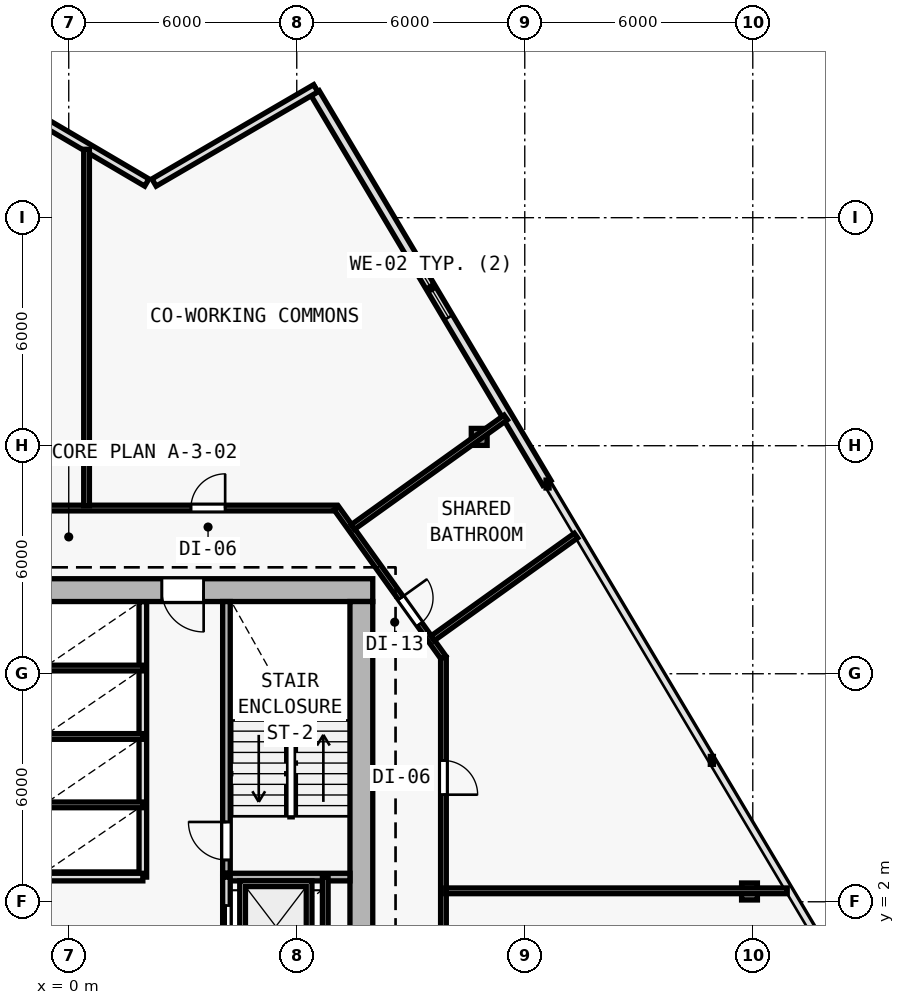
"""IFC4 building model, lengths in metres.
Left out: names, types, materials, properties, quantities, classifications, styles, units other than length and angle.
Written with IfcOpenShell. Run it as: python <this file> out.ifc"""

import sys

from ifc_helpers import new_model, si_unit, direction, frame, frame_2d, origin, origin_2d, place, context, subcontext, project, spatial, rectangle, i_section, extrude, element, fill, save


model = new_model("IFC4")
c1 = context("Model", 3, precision=1e-05, world=origin(), true_north=direction((0.0, 1.0)))
c2 = subcontext(c1, "Body", "Model", "MODEL_VIEW")
j1 = project(units=[si_unit("LENGTHUNIT", "METRE"), si_unit("PLANEANGLEUNIT", "RADIAN")], contexts=[c1])
p1 = place(None, origin())
s1 = spatial("IfcSite", under=j1, at=p1, CompositionType="ELEMENT")
p2 = place(p1, origin())
s2 = spatial("IfcBuilding", under=s1, at=p2, CompositionType="ELEMENT")
p3 = place(p2, frame((0.0, 0.0, 33.6)))
s3 = spatial("IfcBuildingStorey", under=s2, at=p3, CompositionType="ELEMENT", Elevation=33.6)
p4 = place(p3, frame((7.7, 10.2, 0.0), z_axis=(0.0, 0.0, 1.0), x_axis=(1.0, 0.0, 0.0)))
e1 = element("IfcColumn", 1, at=p4, inside=s3, PredefinedType="COLUMN", context=c2, shape_type="SweptSolid", body=[
    extrude(i_section(OverallWidth=0.416, OverallDepth=0.446, WebThickness=0.025, FlangeThickness=0.04, FilletRadius=0.015, at=origin_2d()), origin(), (0.0, 0.0, 1.0), 3.6),
])
p5 = place(p3, frame((17.914, 2.271, 0.005), z_axis=(-0.018906041, 0.009521027842, 0.999775930718), x_axis=(-0.449781931574, -0.893138406984, 0.0)))
e2 = element("IfcColumn", 2, at=p5, inside=s3, PredefinedType="COLUMN", context=c2, shape_type="SweptSolid", body=[
    extrude(i_section(OverallWidth=0.416, OverallDepth=0.446, WebThickness=0.025, FlangeThickness=0.04, FilletRadius=0.015, at=origin_2d()), origin(), (0.0, 0.0, 1.0), 3.59),
])
p6 = place(p3, frame((10.801, 14.232, 0.005), z_axis=(-0.011767054935, -0.002516653368, 0.999927598816), x_axis=(0.209143047003, -0.977885057607, 0.0)))
e3 = element("IfcColumn", 3, at=p6, inside=s3, PredefinedType="COLUMN", context=c2, shape_type="SweptSolid", body=[
    extrude(i_section(OverallWidth=0.416, OverallDepth=0.446, WebThickness=0.025, FlangeThickness=0.04, FilletRadius=0.015, at=origin_2d()), origin(), (0.0, 0.0, 1.0), 3.589),
])
p7 = place(p3, frame((6.483, 23.278, 0.0), z_axis=(0.0, 0.0, 1.0), x_axis=(0.511086421046, -0.859529330635, 0.0)))
e4 = element("IfcWall", 4, at=p7, inside=s3, PredefinedType="SOLIDWALL", context=c2, shape_type="SweptSolid", body=[
    extrude(rectangle(XDim=11.935, YDim=0.25, at=frame_2d((5.968, 0.0))), origin(), (0.0, 0.0, 1.0), 3.35),
])
p8 = place(p7, frame((5.068, 0.0, 0.62)))
e5 = element("IfcOpeningElement", 5, at=p8, cuts=e4, PredefinedType="OPENING", context=c2, shape_type="SweptSolid", body=[
    extrude(rectangle(XDim=1.8, YDim=2.1, at=frame_2d((0.9, 1.05))), frame((0.0, 0.135, 0.0), z_axis=(0.0, -1.0, 0.0), x_axis=(1.0, 0.0, 0.0)), (0.0, 0.0, 1.0), 0.27),
])
p9 = place(p3, frame((2.245, 20.925, 0.0), z_axis=(0.0, 0.0, 1.0), x_axis=(0.863967641515, 0.503547330858, 0.0)))
e6 = element("IfcWall", 6, at=p9, inside=s3, PredefinedType="SOLIDWALL", context=c2, shape_type="SweptSolid", body=[
    extrude(rectangle(XDim=4.925, YDim=0.22, at=frame_2d((2.462, 0.0))), origin(), (0.0, 0.0, 1.0), 3.35),
])
p10 = place(p3, frame((-2.635, 23.681, 0.0), z_axis=(0.0, 0.0, 1.0), x_axis=(0.862126841454, -0.506692519428, 0.0)))
e7 = element("IfcWall", 7, at=p10, inside=s3, PredefinedType="SOLIDWALL", context=c2, shape_type="SweptSolid", body=[
    extrude(rectangle(XDim=5.439, YDim=0.22, at=frame_2d((2.72, 0.0))), origin(), (0.0, 0.0, 1.0), 3.35),
])
p11 = place(p3, frame((8.0, 10.2, 0.0), z_axis=(0.0, 0.0, 1.0), x_axis=(-1.0, 0.0, 0.0)))
e8 = element("IfcWall", 8, at=p11, inside=s3, PredefinedType="SHEAR", context=c2, shape_type="SweptSolid", body=[
    extrude(rectangle(XDim=16.0, YDim=0.6, at=frame_2d((8.0, 0.0))), origin(), (0.0, 0.0, 1.0), 3.35),
])
p12 = place(p11, frame((4.45, 0.0, 0.0)))
e9 = element("IfcOpeningElement", 9, at=p12, cuts=e8, PredefinedType="OPENING", context=c2, shape_type="SweptSolid", body=[
    extrude(rectangle(XDim=1.1, YDim=2.15, at=frame_2d((0.55, 1.075))), frame((0.0, 0.31, 0.0), z_axis=(0.0, -1.0, 0.0), x_axis=(1.0, 0.0, 0.0)), (0.0, 0.0, 1.0), 0.62),
])
p13 = place(p3, frame((7.7, 9.9, 0.0), z_axis=(0.0, 0.0, 1.0), x_axis=(0.0, -1.0, 0.0)))
e10 = element("IfcWall", 10, at=p13, inside=s3, PredefinedType="SHEAR", context=c2, shape_type="SweptSolid", body=[
    extrude(rectangle(XDim=19.0, YDim=0.6, at=frame_2d((9.5, 0.0))), origin(), (0.0, 0.0, 1.0), 3.35),
])
p14 = place(p3, frame((4.15, 2.75, 0.0), z_axis=(0.0, 0.0, 1.0), x_axis=(0.0, 1.0, 0.0)))
e11 = element("IfcWall", 11, at=p14, inside=s3, PredefinedType="SOLIDWALL", context=c2, shape_type="SweptSolid", body=[
    extrude(rectangle(XDim=7.15, YDim=0.2, at=frame_2d((3.575, 0.0))), origin(), (0.0, 0.0, 1.0), 3.35),
])
p15 = place(p14, frame((0.35, 0.0, 0.0)))
e12 = element("IfcOpeningElement", 12, at=p15, cuts=e11, PredefinedType="OPENING", context=c2, shape_type="SweptSolid", body=[
    extrude(rectangle(XDim=1.0, YDim=2.15, at=frame_2d((0.5, 1.075))), frame((0.0, 0.11, 0.0), z_axis=(0.0, -1.0, 0.0), x_axis=(1.0, 0.0, 0.0)), (0.0, 0.0, 1.0), 0.22),
])
p16 = place(p3, frame((4.05, 2.65, 0.0), z_axis=(0.0, 0.0, 1.0), x_axis=(1.0, 0.0, 0.0)))
e13 = element("IfcWall", 13, at=p16, inside=s3, PredefinedType="SOLIDWALL", context=c2, shape_type="SweptSolid", body=[
    extrude(rectangle(XDim=3.35, YDim=0.2, at=frame_2d((1.675, 0.0))), origin(), (0.0, 0.0, 1.0), 3.35),
])
p17 = place(p3, frame((4.15, -6.05, 0.0), z_axis=(0.0, 0.0, 1.0), x_axis=(0.0, 1.0, 0.0)))
e14 = element("IfcWall", 14, at=p17, inside=s3, PredefinedType="SOLIDWALL", context=c2, shape_type="SweptSolid", body=[
    extrude(rectangle(XDim=8.7, YDim=0.2, at=frame_2d((4.35, 0.0))), origin(), (0.0, 0.0, 1.0), 3.35),
])
p18 = place(p17, frame((0.55, 0.0, 0.0)))
e15 = element("IfcOpeningElement", 15, at=p18, cuts=e14, PredefinedType="OPENING", context=c2, shape_type="SweptSolid", body=[
    extrude(rectangle(XDim=1.1, YDim=2.15, at=frame_2d((0.55, 1.075))), frame((0.0, 0.11, 0.0), z_axis=(0.0, -1.0, 0.0), x_axis=(1.0, 0.0, 0.0)), (0.0, 0.0, 1.0), 0.22),
])
p19 = place(p17, frame((2.65, 0.0, 0.0)))
e16 = element("IfcOpeningElement", 16, at=p19, cuts=e14, PredefinedType="OPENING", context=c2, shape_type="SweptSolid", body=[
    extrude(rectangle(XDim=1.1, YDim=2.15, at=frame_2d((0.55, 1.075))), frame((0.0, 0.11, 0.0), z_axis=(0.0, -1.0, 0.0), x_axis=(1.0, 0.0, 0.0)), (0.0, 0.0, 1.0), 0.22),
])
p20 = place(p17, frame((4.75, 0.0, 0.0)))
e17 = element("IfcOpeningElement", 17, at=p20, cuts=e14, PredefinedType="OPENING", context=c2, shape_type="SweptSolid", body=[
    extrude(rectangle(XDim=1.1, YDim=2.15, at=frame_2d((0.55, 1.075))), frame((0.0, 0.11, 0.0), z_axis=(0.0, -1.0, 0.0), x_axis=(1.0, 0.0, 0.0)), (0.0, 0.0, 1.0), 0.22),
])
p21 = place(p17, frame((6.85, 0.0, 0.0)))
e18 = element("IfcOpeningElement", 18, at=p21, cuts=e14, PredefinedType="OPENING", context=c2, shape_type="SweptSolid", body=[
    extrude(rectangle(XDim=1.1, YDim=2.15, at=frame_2d((0.55, 1.075))), frame((0.0, 0.11, 0.0), z_axis=(0.0, -1.0, 0.0), x_axis=(1.0, 0.0, 0.0)), (0.0, 0.0, 1.0), 0.22),
])
p22 = place(p3, frame((6.75, -6.05, 0.0), z_axis=(0.0, 0.0, 1.0), x_axis=(0.0, 1.0, 0.0)))
e19 = element("IfcWall", 19, at=p22, inside=s3, PredefinedType="PARTITIONING", context=c2, shape_type="SweptSolid", body=[
    extrude(rectangle(XDim=8.7, YDim=0.15, at=frame_2d((4.35, 0.0))), origin(), (0.0, 0.0, 1.0), 3.35),
])
p23 = place(p3, frame((1.95, 2.65, 0.0), z_axis=(0.0, 0.0, 1.0), x_axis=(0.0, 1.0, 0.0)))
e20 = element("IfcWall", 20, at=p23, inside=s3, PredefinedType="SOLIDWALL", context=c2, shape_type="SweptSolid", body=[
    extrude(rectangle(XDim=7.245, YDim=0.2, at=frame_2d((3.623, 0.0))), origin(), (0.0, 0.0, 1.0), 3.35),
])
p24 = place(p3, frame((-0.95, 2.65, 0.0), z_axis=(0.0, 0.0, 1.0), x_axis=(1.0, 0.0, 0.0)))
e21 = element("IfcWall", 21, at=p24, inside=s3, PredefinedType="SOLIDWALL", context=c2, shape_type="SweptSolid", body=[
    extrude(rectangle(XDim=2.9, YDim=0.2, at=frame_2d((1.45, 0.0))), origin(), (0.0, 0.0, 1.0), 3.35),
])
for number, where, z_axis, x_axis in (
    (22, (-0.75, 4.55, 0.0), (0.0, 0.0, 1.0), (1.0, 0.0, 0.0)),
    (23, (-0.75, 6.35, 0.0), (0.0, 0.0, 1.0), (1.0, 0.0, 0.0)),
    (24, (-0.75, 8.15, 0.0), (0.0, 0.0, 1.0), (1.0, 0.0, 0.0)),
):
    element("IfcWall", number, at=place(p3, frame(where, z_axis=z_axis, x_axis=x_axis)), inside=s3, PredefinedType="PARTITIONING", context=c2, shape_type="SweptSolid", body=[
        extrude(rectangle(XDim=2.7, YDim=0.15, at=frame_2d((1.35, 0.0))), origin(), (0.0, 0.0, 1.0), 3.35),
    ])
p25 = place(p3, frame((-7.041, 12.36, 0.0), z_axis=(0.0, 0.0, 1.0), x_axis=(1.0, 0.0, 0.0)))
e25 = element("IfcWall", 25, at=p25, inside=s3, PredefinedType="PARTITIONING", context=c2, shape_type="SweptSolid", body=[
    extrude(rectangle(XDim=14.082, YDim=0.15, at=frame_2d((7.041, 0.0))), origin(), (0.0, 0.0, 1.0), 3.35),
])
p26 = place(p25, frame((10.257, 0.0, 0.0)))
e26 = element("IfcOpeningElement", 26, at=p26, cuts=e25, PredefinedType="OPENING", context=c2, shape_type="SweptSolid", body=[
    extrude(rectangle(XDim=0.9, YDim=2.1, at=frame_2d((0.45, 1.05))), frame((0.0, 0.085, 0.0), z_axis=(0.0, -1.0, 0.0), x_axis=(1.0, 0.0, 0.0)), (0.0, 0.0, 1.0), 0.17),
])
p27 = place(p25, frame((3.394, 0.0, 0.0)))
e27 = element("IfcOpeningElement", 27, at=p27, cuts=e25, PredefinedType="OPENING", context=c2, shape_type="SweptSolid", body=[
    extrude(rectangle(XDim=0.9, YDim=2.1, at=frame_2d((0.45, 1.05))), frame((0.0, 0.085, 0.0), z_axis=(0.0, -1.0, 0.0), x_axis=(1.0, 0.0, 0.0)), (0.0, 0.0, 1.0), 0.17),
])
p28 = place(p3, frame((7.041, 12.36, 0.0), z_axis=(0.0, 0.0, 1.0), x_axis=(0.582449511476, -0.812866881218, 0.0)))
e28 = element("IfcWall", 28, at=p28, inside=s3, PredefinedType="PARTITIONING", context=c2, shape_type="SweptSolid", body=[
    extrude(rectangle(XDim=4.84, YDim=0.15, at=frame_2d((2.42, 0.0))), origin(), (0.0, 0.0, 1.0), 2.725),
])
p29 = place(p28, frame((2.911, 0.0, 0.0)))
e29 = element("IfcOpeningElement", 29, at=p29, cuts=e28, PredefinedType="OPENING", context=c2, shape_type="SweptSolid", body=[
    extrude(rectangle(XDim=0.85, YDim=2.1, at=frame_2d((0.425, 1.05))), frame((0.0, 0.085, 0.0), z_axis=(0.0, -1.0, 0.0), x_axis=(1.0, 0.0, 0.0)), (0.0, 0.0, 1.0), 0.17),
])
p30 = place(p3, frame((9.86, 8.426, 0.0), z_axis=(0.0, 0.0, 1.0), x_axis=(0.0, -1.0, 0.0)))
e30 = element("IfcWall", 30, at=p30, inside=s3, PredefinedType="PARTITIONING", context=c2, shape_type="SweptSolid", body=[
    extrude(rectangle(XDim=19.986, YDim=0.15, at=frame_2d((9.993, 0.0))), origin(), (0.0, 0.0, 1.0), 2.609),
])
p31 = place(p30, frame((18.592, 0.0, 0.0)))
e31 = element("IfcOpeningElement", 31, at=p31, cuts=e30, PredefinedType="OPENING", context=c2, shape_type="SweptSolid", body=[
    extrude(rectangle(XDim=0.9, YDim=2.1, at=frame_2d((0.45, 1.05))), frame((0.0, 0.085, 0.0), z_axis=(0.0, -1.0, 0.0), x_axis=(1.0, 0.0, 0.0)), (0.0, 0.0, 1.0), 0.17),
])
p32 = place(p30, frame((14.386, 0.0, 0.0)))
e32 = element("IfcOpeningElement", 32, at=p32, cuts=e30, PredefinedType="OPENING", context=c2, shape_type="SweptSolid", body=[
    extrude(rectangle(XDim=0.9, YDim=2.1, at=frame_2d((0.45, 1.05))), frame((0.0, 0.085, 0.0), z_axis=(0.0, -1.0, 0.0), x_axis=(1.0, 0.0, 0.0)), (0.0, 0.0, 1.0), 0.17),
])
p33 = place(p30, frame((8.417, 0.0, 0.0)))
e33 = element("IfcOpeningElement", 33, at=p33, cuts=e30, PredefinedType="OPENING", context=c2, shape_type="SweptSolid", body=[
    extrude(rectangle(XDim=0.9, YDim=2.1, at=frame_2d((0.45, 1.05))), frame((0.0, 0.085, 0.0), z_axis=(0.0, -1.0, 0.0), x_axis=(1.0, 0.0, 0.0)), (0.0, 0.0, 1.0), 0.17),
])
p34 = place(p30, frame((2.708, 0.0, 0.0)))
e34 = element("IfcOpeningElement", 34, at=p34, cuts=e30, PredefinedType="OPENING", context=c2, shape_type="SweptSolid", body=[
    extrude(rectangle(XDim=0.9, YDim=2.1, at=frame_2d((0.45, 1.05))), frame((0.0, 0.085, 0.0), z_axis=(0.0, -1.0, 0.0), x_axis=(1.0, 0.0, 0.0)), (0.0, 0.0, 1.0), 0.17),
])
p35 = place(p3, frame((9.92, 2.288, 0.0), z_axis=(0.0, 0.0, 1.0), x_axis=(1.0, 0.0, 0.0)))
e35 = element("IfcWall", 35, at=p35, inside=s3, PredefinedType="PARTITIONING", context=c2, shape_type="SweptSolid", body=[
    extrude(rectangle(XDim=8.986, YDim=0.15, at=frame_2d((4.493, 0.0))), origin(), (0.0, 0.0, 1.0), 2.735),
])
p36 = place(p3, frame((7.474, 11.859, 0.0), z_axis=(0.0, 0.0, 1.0), x_axis=(0.812866530719, 0.582450000633, 0.0)))
e36 = element("IfcWall", 36, at=p36, inside=s3, PredefinedType="PARTITIONING", context=c2, shape_type="SweptSolid", body=[
    extrude(rectangle(XDim=4.952, YDim=0.15, at=frame_2d((2.476, 0.0))), origin(), (0.0, 0.0, 1.0), 2.725),
])
p37 = place(p3, frame((9.573, 8.93, 0.0), z_axis=(0.0, 0.0, 1.0), x_axis=(0.812855287807, 0.582465690907, 0.0)))
e37 = element("IfcWall", 37, at=p37, inside=s3, PredefinedType="PARTITIONING", context=c2, shape_type="SweptSolid", body=[
    extrude(rectangle(XDim=4.645, YDim=0.15, at=frame_2d((2.322, 0.0))), origin(), (0.0, 0.0, 1.0), 2.735),
])
p38 = place(p3, frame((0.469, 12.42, 0.0), z_axis=(0.0, 0.0, 1.0), x_axis=(0.0, 1.0, 0.0)))
e38 = element("IfcWall", 38, at=p38, inside=s3, PredefinedType="PARTITIONING", context=c2, shape_type="SweptSolid", body=[
    extrude(rectangle(XDim=9.379, YDim=0.15, at=frame_2d((4.69, 0.0))), origin(), (0.0, 0.0, 1.0), 2.735),
])
p39 = place(p8, origin())
e39 = element("IfcWindow", 39, at=p39, inside=s3, PartitioningType="SINGLE_PANEL", PredefinedType="WINDOW", context=c2, shape_type="SweptSolid", body=[
    extrude(rectangle(XDim=1.8, YDim=2.1, at=frame_2d((0.9, 1.05))), frame((0.0, 0.03, 0.0), z_axis=(0.0, -1.0, 0.0), x_axis=(1.0, 0.0, 0.0)), (0.0, 0.0, 1.0), 0.06),
])
fill(e5, e39)
p40 = place(p12, origin())
e40 = element("IfcDoor", 40, at=p40, inside=s3, OperationType="SINGLE_SWING_LEFT", PredefinedType="DOOR", context=c2, shape_type="SweptSolid", body=[
    extrude(rectangle(XDim=1.1, YDim=2.15, at=frame_2d((0.55, 1.075))), frame((0.0, 0.025, 0.0), z_axis=(0.0, -1.0, 0.0), x_axis=(1.0, 0.0, 0.0)), (0.0, 0.0, 1.0), 0.05),
])
fill(e9, e40)
p41 = place(p15, origin())
e41 = element("IfcDoor", 41, at=p41, inside=s3, OperationType="SINGLE_SWING_RIGHT", PredefinedType="DOOR", context=c2, shape_type="SweptSolid", body=[
    extrude(rectangle(XDim=1.0, YDim=2.15, at=frame_2d((0.5, 1.075))), frame((0.0, 0.025, 0.0), z_axis=(0.0, -1.0, 0.0), x_axis=(1.0, 0.0, 0.0)), (0.0, 0.0, 1.0), 0.05),
])
fill(e12, e41)
p42 = place(p21, origin())
e42 = element("IfcDoor", 42, at=p42, inside=s3, OperationType="DOUBLE_DOOR_SLIDING", PredefinedType="DOOR", context=c2, shape_type="SweptSolid", body=[
    extrude(rectangle(XDim=1.1, YDim=2.15, at=frame_2d((0.55, 1.075))), frame((0.0, 0.025, 0.0), z_axis=(0.0, -1.0, 0.0), x_axis=(1.0, 0.0, 0.0)), (0.0, 0.0, 1.0), 0.05),
])
fill(e18, e42)
p43 = place(p34, origin())
e43 = element("IfcDoor", 43, at=p43, inside=s3, OperationType="SINGLE_SWING_RIGHT", PredefinedType="DOOR", context=c2, shape_type="SweptSolid", body=[
    extrude(rectangle(XDim=0.9, YDim=2.1, at=frame_2d((0.45, 1.05))), frame((0.0, 0.025, 0.0), z_axis=(0.0, -1.0, 0.0), x_axis=(1.0, 0.0, 0.0)), (0.0, 0.0, 1.0), 0.05),
])
fill(e34, e43)
p44 = place(p29, origin())
e44 = element("IfcDoor", 44, at=p44, inside=s3, OperationType="SINGLE_SWING_LEFT", PredefinedType="DOOR", context=c2, shape_type="SweptSolid", body=[
    extrude(rectangle(XDim=0.85, YDim=2.1, at=frame_2d((0.425, 1.05))), frame((0.0, 0.025, 0.0), z_axis=(0.0, -1.0, 0.0), x_axis=(1.0, 0.0, 0.0)), (0.0, 0.0, 1.0), 0.05),
])
fill(e29, e44)
p45 = place(p26, origin())
e45 = element("IfcDoor", 45, at=p45, inside=s3, OperationType="SINGLE_SWING_RIGHT", PredefinedType="DOOR", context=c2, shape_type="SweptSolid", body=[
    extrude(rectangle(XDim=0.9, YDim=2.1, at=frame_2d((0.45, 1.05))), frame((0.0, 0.025, 0.0), z_axis=(0.0, -1.0, 0.0), x_axis=(1.0, 0.0, 0.0)), (0.0, 0.0, 1.0), 0.05),
])
fill(e26, e45)
save(model, sys.argv[1])
